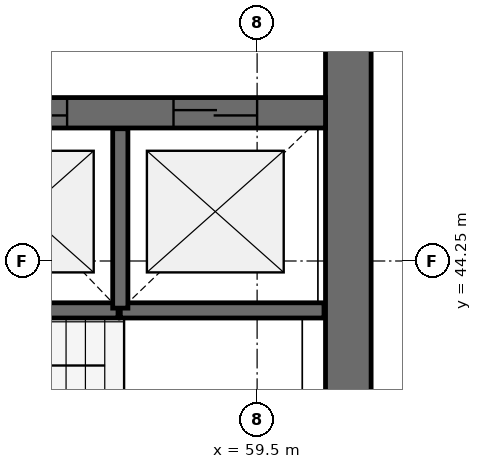
"""IFC4 building model, lengths in metres.
Left out: names, types, materials, properties, quantities, classifications, styles, units other than length and angle.
Written with IfcOpenShell. Run it as: python <this file> out.ifc"""

import sys

from ifc_helpers import new_model, si_unit, direction, frame, frame_2d, origin, place, context, subcontext, project, spatial, rectangle, extrude, source, transform, mapped, element, fill, save


model = new_model("IFC4")
c1 = context("Model", 3, precision=1e-05, world=origin(), true_north=direction((0.0, 1.0)))
c2 = subcontext(c1, "Body", "Model", "MODEL_VIEW")
j1 = project(units=[si_unit("LENGTHUNIT", "METRE"), si_unit("PLANEANGLEUNIT", "RADIAN")], contexts=[c1])
p1 = place(None, origin())
s1 = spatial("IfcSite", under=j1, at=p1, CompositionType="ELEMENT")
p2 = place(p1, origin())
s2 = spatial("IfcBuilding", under=s1, at=p2, CompositionType="ELEMENT")
p3 = place(p2, frame((0.0, 0.0, 234.5)))
s3 = spatial("IfcBuildingStorey", under=s2, at=p3, CompositionType="ELEMENT", Elevation=234.5)
p4 = place(p3, frame((60.7, 40.0, 0.0), z_axis=(0.0, 0.0, 1.0), x_axis=(0.0, 1.0, 0.0)))
e1 = element("IfcWall", 1, at=p4, inside=s3, PredefinedType="SHEAR", context=c2, shape_type="SweptSolid", body=[
    extrude(rectangle(XDim=16.0, YDim=0.6, at=frame_2d((8.0, 0.0))), origin(), (0.0, 0.0, 1.0), 3.9),
])
p5 = place(p4, frame((7.1, 0.0, 0.0)))
e2 = element("IfcOpeningElement", 2, at=p5, cuts=e1, PredefinedType="OPENING", context=c2, shape_type="SweptSolid", body=[
    extrude(rectangle(XDim=1.8, YDim=2.1, at=frame_2d((0.9, 1.05))), frame((0.0, 0.31, 0.0), z_axis=(0.0, -1.0, 0.0), x_axis=(1.0, 0.0, 0.0)), (0.0, 0.0, 1.0), 0.62),
])
p6 = place(p3, frame((43.6, 46.2, 0.0), z_axis=(0.0, 0.0, 1.0), x_axis=(1.0, 0.0, 0.0)))
e3 = element("IfcWall", 3, at=p6, inside=s3, PredefinedType="SHEAR", context=c2, shape_type="SweptSolid", body=[
    extrude(rectangle(XDim=16.8, YDim=0.4, at=frame_2d((8.4, 0.0))), origin(), (0.0, 0.0, 1.0), 3.9),
])
p7 = place(p6, frame((9.8, 0.0, 0.0)))
e4 = element("IfcOpeningElement", 4, at=p7, cuts=e3, PredefinedType="OPENING", context=c2, shape_type="SweptSolid", body=[
    extrude(rectangle(XDim=1.1, YDim=2.1, at=frame_2d((0.55, 1.05))), frame((0.0, 0.21, 0.0), z_axis=(0.0, -1.0, 0.0), x_axis=(1.0, 0.0, 0.0)), (0.0, 0.0, 1.0), 0.42),
])
p8 = place(p6, frame((12.3, 0.0, 0.0)))
e5 = element("IfcOpeningElement", 5, at=p8, cuts=e3, PredefinedType="OPENING", context=c2, shape_type="SweptSolid", body=[
    extrude(rectangle(XDim=1.1, YDim=2.1, at=frame_2d((0.55, 1.05))), frame((0.0, 0.21, 0.0), z_axis=(0.0, -1.0, 0.0), x_axis=(1.0, 0.0, 0.0)), (0.0, 0.0, 1.0), 0.42),
])
p9 = place(p6, frame((14.8, 0.0, 0.0)))
e6 = element("IfcOpeningElement", 6, at=p9, cuts=e3, PredefinedType="OPENING", context=c2, shape_type="SweptSolid", body=[
    extrude(rectangle(XDim=1.1, YDim=2.1, at=frame_2d((0.55, 1.05))), frame((0.0, 0.21, 0.0), z_axis=(0.0, -1.0, 0.0), x_axis=(1.0, 0.0, 0.0)), (0.0, 0.0, 1.0), 0.42),
])
p10 = place(p6, frame((7.85, 0.0, 0.0)))
e7 = element("IfcOpeningElement", 7, at=p10, cuts=e3, PredefinedType="OPENING", context=c2, shape_type="SweptSolid", body=[
    extrude(rectangle(XDim=0.9, YDim=2.1, at=frame_2d((0.45, 1.05))), frame((0.0, 0.21, 0.0), z_axis=(0.0, -1.0, 0.0), x_axis=(1.0, 0.0, 0.0)), (0.0, 0.0, 1.0), 0.42),
])
p11 = place(p3, frame((57.7, 43.6, 0.0), z_axis=(0.0, 0.0, 1.0), x_axis=(1.0, 0.0, 0.0)))
e8 = element("IfcWall", 8, at=p11, inside=s3, PredefinedType="SOLIDWALL", context=c2, shape_type="SweptSolid", body=[
    extrude(rectangle(XDim=2.68, YDim=0.2, at=frame_2d((1.34, 0.0))), origin(), (0.0, 0.0, 1.0), 3.58),
])
p12 = place(p3, frame((55.2, 43.6, 0.0), z_axis=(0.0, 0.0, 1.0), x_axis=(1.0, 0.0, 0.0)))
e9 = element("IfcWall", 9, at=p12, inside=s3, PredefinedType="SOLIDWALL", context=c2, shape_type="SweptSolid", body=[
    extrude(rectangle(XDim=2.47, YDim=0.2, at=frame_2d((1.235, 0.0))), origin(), (0.0, 0.0, 1.0), 3.58),
])
p13 = place(p3, frame((57.7, 43.63, 0.0), z_axis=(0.0, 0.0, 1.0), x_axis=(0.0, 1.0, 0.0)))
e10 = element("IfcWall", 10, at=p13, inside=s3, PredefinedType="SOLIDWALL", context=c2, shape_type="SweptSolid", body=[
    extrude(rectangle(XDim=2.36, YDim=0.2, at=frame_2d((1.18, 0.0))), origin(), (0.0, 0.0, 1.0), 3.58),
])
m1 = source(origin(), c2, "Body", "SweptSolid", [
    extrude(rectangle(XDim=1.1, YDim=2.1, at=frame_2d((0.55, 1.05))), frame((0.0, 0.025, 0.0), z_axis=(0.0, -1.0, 0.0), x_axis=(1.0, 0.0, 0.0)), (0.0, 0.0, 1.0), 0.05),
])
p14 = place(p8, origin())
e11 = element("IfcDoor", 11, at=p14, inside=s3, OperationType="DOUBLE_DOOR_SLIDING", PredefinedType="USERDEFINED", context=c2, shape_type="MappedRepresentation", body=[
    mapped(m1, transform((0.0, 0.0, 0.0), scale=1.0)),
])
fill(e5, e11)
p15 = place(p9, origin())
e12 = element("IfcDoor", 12, at=p15, inside=s3, OperationType="DOUBLE_DOOR_SLIDING", PredefinedType="USERDEFINED", context=c2, shape_type="MappedRepresentation", body=[
    mapped(m1, transform((0.0, 0.0, 0.0), scale=1.0)),
])
fill(e6, e12)
save(model, sys.argv[1])
